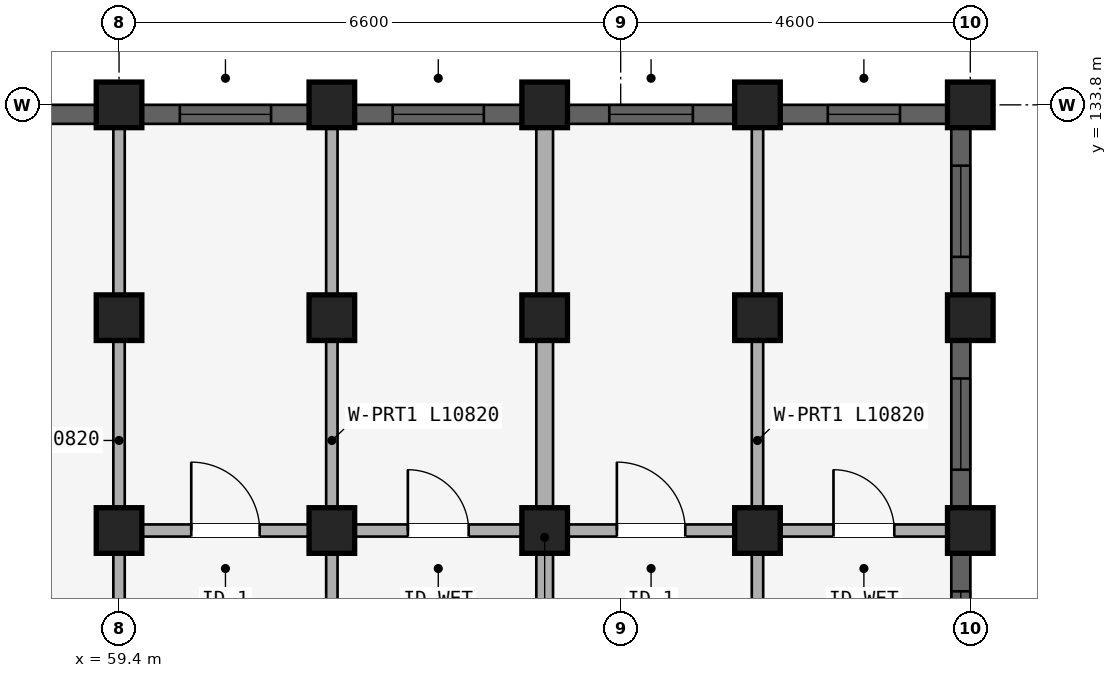
"""IFC4 building model, lengths in metres.
Left out: names, types, materials, properties, quantities, classifications, styles, units other than length and angle.
Written with IfcOpenShell. Run it as: python <this file> out.ifc"""

import sys

from ifc_helpers import new_model, si_unit, direction, frame, frame_2d, origin, origin_2d, place, context, subcontext, project, spatial, rectangle, extrude, element, fill, save


model = new_model("IFC4")
c1 = context("Model", 3, precision=1e-05, world=origin(), true_north=direction((0.0, 1.0)))
c2 = subcontext(c1, "Body", "Model", "MODEL_VIEW")
j1 = project(units=[si_unit("LENGTHUNIT", "METRE"), si_unit("PLANEANGLEUNIT", "RADIAN")], contexts=[c1])
p1 = place(None, origin())
s1 = spatial("IfcSite", under=j1, at=p1, CompositionType="ELEMENT")
p2 = place(p1, origin())
s2 = spatial("IfcBuilding", under=s1, at=p2, CompositionType="ELEMENT")
p3 = place(p2, frame((0.0, 0.0, 30.75)))
s3 = spatial("IfcBuildingStorey", under=s2, at=p3, CompositionType="ELEMENT", Elevation=30.75)
for number, where, z_axis, x_axis in (
    (1, (59.4, 128.2, 0.0), (0.0, 0.0, 1.0), (1.0, 0.0, 0.0)),
    (2, (59.4, 131.0, 0.0), (0.0, 0.0, 1.0), (1.0, 0.0, 0.0)),
    (3, (59.4, 133.8, 0.0), (0.0, 0.0, 1.0), (1.0, 0.0, 0.0)),
    (4, (62.2, 128.2, 0.0), (0.0, 0.0, 1.0), (1.0, 0.0, 0.0)),
    (5, (62.2, 131.0, 0.0), (0.0, 0.0, 1.0), (1.0, 0.0, 0.0)),
    (6, (62.2, 133.8, 0.0), (0.0, 0.0, 1.0), (1.0, 0.0, 0.0)),
    (7, (65.0, 128.2, 0.0), (0.0, 0.0, 1.0), (1.0, 0.0, 0.0)),
    (8, (65.0, 131.0, 0.0), (0.0, 0.0, 1.0), (1.0, 0.0, 0.0)),
    (9, (65.0, 133.8, 0.0), (0.0, 0.0, 1.0), (1.0, 0.0, 0.0)),
    (10, (67.8, 128.2, 0.0), (0.0, 0.0, 1.0), (1.0, 0.0, 0.0)),
    (11, (67.8, 131.0, 0.0), (0.0, 0.0, 1.0), (1.0, 0.0, 0.0)),
    (12, (67.8, 133.8, 0.0), (0.0, 0.0, 1.0), (1.0, 0.0, 0.0)),
    (13, (70.6, 128.2, 0.0), (0.0, 0.0, 1.0), (1.0, 0.0, 0.0)),
    (14, (70.6, 131.0, 0.0), (0.0, 0.0, 1.0), (1.0, 0.0, 0.0)),
    (15, (70.6, 133.8, 0.0), (0.0, 0.0, 1.0), (1.0, 0.0, 0.0)),
):
    element("IfcColumn", number, at=place(p3, frame(where, z_axis=z_axis, x_axis=x_axis)), inside=s3, PredefinedType="COLUMN", context=c2, shape_type="SweptSolid", body=[
        extrude(rectangle(XDim=0.6, YDim=0.6, at=origin_2d()), origin(), (0.0, 0.0, 1.0), 2.93),
    ])
p4 = place(p3, frame((59.48, 128.2, 0.0), z_axis=(0.0, 0.0, 1.0), x_axis=(1.0, 0.0, 0.0)))
e16 = element("IfcWall", 16, at=p4, inside=s3, PredefinedType="PLUMBINGWALL", context=c2, shape_type="SweptSolid", body=[
    extrude(rectangle(XDim=2.64, YDim=0.16, at=frame_2d((1.32, 0.0))), origin(), (0.0, 0.0, 1.0), 2.372),
])
p5 = place(p4, frame((0.87, 0.0, 0.0)))
e17 = element("IfcOpeningElement", 17, at=p5, cuts=e16, PredefinedType="OPENING", context=c2, shape_type="SweptSolid", body=[
    extrude(rectangle(XDim=0.9, YDim=2.1, at=frame_2d((0.45, 1.05))), frame((0.0, 0.09, 0.0), z_axis=(0.0, -1.0, 0.0), x_axis=(1.0, 0.0, 0.0)), (0.0, 0.0, 1.0), 0.18),
])
p6 = place(p3, frame((62.28, 128.2, 0.0), z_axis=(0.0, 0.0, 1.0), x_axis=(1.0, 0.0, 0.0)))
e18 = element("IfcWall", 18, at=p6, inside=s3, PredefinedType="PLUMBINGWALL", context=c2, shape_type="SweptSolid", body=[
    extrude(rectangle(XDim=2.64, YDim=0.16, at=frame_2d((1.32, 0.0))), origin(), (0.0, 0.0, 1.0), 2.372),
])
p7 = place(p6, frame((0.92, 0.0, 0.0)))
e19 = element("IfcOpeningElement", 19, at=p7, cuts=e18, PredefinedType="OPENING", context=c2, shape_type="SweptSolid", body=[
    extrude(rectangle(XDim=0.8, YDim=2.1, at=frame_2d((0.4, 1.05))), frame((0.0, 0.09, 0.0), z_axis=(0.0, -1.0, 0.0), x_axis=(1.0, 0.0, 0.0)), (0.0, 0.0, 1.0), 0.18),
])
p8 = place(p3, frame((65.08, 128.2, 0.0), z_axis=(0.0, 0.0, 1.0), x_axis=(1.0, 0.0, 0.0)))
e20 = element("IfcWall", 20, at=p8, inside=s3, PredefinedType="PLUMBINGWALL", context=c2, shape_type="SweptSolid", body=[
    extrude(rectangle(XDim=2.64, YDim=0.16, at=frame_2d((1.32, 0.0))), origin(), (0.0, 0.0, 1.0), 2.372),
])
p9 = place(p8, frame((0.87, 0.0, 0.0)))
e21 = element("IfcOpeningElement", 21, at=p9, cuts=e20, PredefinedType="OPENING", context=c2, shape_type="SweptSolid", body=[
    extrude(rectangle(XDim=0.9, YDim=2.1, at=frame_2d((0.45, 1.05))), frame((0.0, 0.09, 0.0), z_axis=(0.0, -1.0, 0.0), x_axis=(1.0, 0.0, 0.0)), (0.0, 0.0, 1.0), 0.18),
])
p10 = place(p3, frame((67.88, 128.2, 0.0), z_axis=(0.0, 0.0, 1.0), x_axis=(1.0, 0.0, 0.0)))
e22 = element("IfcWall", 22, at=p10, inside=s3, PredefinedType="PLUMBINGWALL", context=c2, shape_type="SweptSolid", body=[
    extrude(rectangle(XDim=2.64, YDim=0.16, at=frame_2d((1.32, 0.0))), origin(), (0.0, 0.0, 1.0), 2.372),
])
p11 = place(p10, frame((0.92, 0.0, 0.0)))
e23 = element("IfcOpeningElement", 23, at=p11, cuts=e22, PredefinedType="OPENING", context=c2, shape_type="SweptSolid", body=[
    extrude(rectangle(XDim=0.8, YDim=2.1, at=frame_2d((0.4, 1.05))), frame((0.0, 0.09, 0.0), z_axis=(0.0, -1.0, 0.0), x_axis=(1.0, 0.0, 0.0)), (0.0, 0.0, 1.0), 0.18),
])
p12 = place(p3, frame((59.4, 122.7, 0.0), z_axis=(0.0, 0.0, 1.0), x_axis=(0.0, 1.0, 0.0)))
e24 = element("IfcWall", 24, at=p12, inside=s3, PredefinedType="PARTITIONING", context=c2, shape_type="SweptSolid", body=[
    extrude(rectangle(XDim=10.82, YDim=0.15, at=frame_2d((5.41, 0.0))), origin(), (0.0, 0.0, 1.0), 2.372),
])
p13 = place(p12, frame((0.899, 0.0, 0.0)))
e25 = element("IfcOpeningElement", 25, at=p13, cuts=e24, PredefinedType="OPENING", context=c2, shape_type="SweptSolid", body=[
    extrude(rectangle(XDim=0.8, YDim=2.1, at=frame_2d((0.4, 1.05))), frame((0.0, 0.085, 0.0), z_axis=(0.0, -1.0, 0.0), x_axis=(1.0, 0.0, 0.0)), (0.0, 0.0, 1.0), 0.17),
])
p14 = place(p3, frame((62.2, 122.7, 0.0), z_axis=(0.0, 0.0, 1.0), x_axis=(0.0, 1.0, 0.0)))
e26 = element("IfcWall", 26, at=p14, inside=s3, PredefinedType="PARTITIONING", context=c2, shape_type="SweptSolid", body=[
    extrude(rectangle(XDim=10.82, YDim=0.15, at=frame_2d((5.41, 0.0))), origin(), (0.0, 0.0, 1.0), 2.372),
])
p15 = place(p14, frame((0.899, 0.0, 0.0)))
e27 = element("IfcOpeningElement", 27, at=p15, cuts=e26, PredefinedType="OPENING", context=c2, shape_type="SweptSolid", body=[
    extrude(rectangle(XDim=0.8, YDim=2.1, at=frame_2d((0.4, 1.05))), frame((0.0, 0.085, 0.0), z_axis=(0.0, -1.0, 0.0), x_axis=(1.0, 0.0, 0.0)), (0.0, 0.0, 1.0), 0.17),
])
p16 = place(p3, frame((65.0, 122.7, 0.0), z_axis=(0.0, 0.0, 1.0), x_axis=(0.0, 1.0, 0.0)))
e28 = element("IfcWall", 28, at=p16, inside=s3, PredefinedType="STANDARD", context=c2, shape_type="SweptSolid", body=[
    extrude(rectangle(XDim=10.82, YDim=0.22, at=frame_2d((5.41, 0.0))), origin(), (0.0, 0.0, 1.0), 2.372),
])
p17 = place(p3, frame((67.8, 122.7, 0.0), z_axis=(0.0, 0.0, 1.0), x_axis=(0.0, 1.0, 0.0)))
e29 = element("IfcWall", 29, at=p17, inside=s3, PredefinedType="PARTITIONING", context=c2, shape_type="SweptSolid", body=[
    extrude(rectangle(XDim=10.82, YDim=0.15, at=frame_2d((5.41, 0.0))), origin(), (0.0, 0.0, 1.0), 2.372),
])
p18 = place(p17, frame((0.899, 0.0, 0.0)))
e30 = element("IfcOpeningElement", 30, at=p18, cuts=e29, PredefinedType="OPENING", context=c2, shape_type="SweptSolid", body=[
    extrude(rectangle(XDim=0.8, YDim=2.1, at=frame_2d((0.4, 1.05))), frame((0.0, 0.085, 0.0), z_axis=(0.0, -1.0, 0.0), x_axis=(1.0, 0.0, 0.0)), (0.0, 0.0, 1.0), 0.17),
])
p19 = place(p3, frame((54.104, 133.675, 0.0), z_axis=(0.0, 0.0, 1.0), x_axis=(1.0, 0.0, 0.0)))
e31 = element("IfcWall", 31, at=p19, inside=s3, PredefinedType="STANDARD", context=c2, shape_type="SweptSolid", body=[
    extrude(rectangle(XDim=4.993, YDim=0.25, at=frame_2d((2.497, 0.0))), origin(), (0.0, 0.0, 1.0), 2.472),
])
p20 = place(p19, frame((2.021, 0.0, 0.88)))
e32 = element("IfcOpeningElement", 32, at=p20, cuts=e31, PredefinedType="OPENING", context=c2, shape_type="SweptSolid", body=[
    extrude(rectangle(XDim=0.95, YDim=1.35, at=frame_2d((0.475, 0.675))), frame((0.0, 0.135, 0.0), z_axis=(0.0, -1.0, 0.0), x_axis=(1.0, 0.0, 0.0)), (0.0, 0.0, 1.0), 0.27),
])
p21 = place(p3, frame((59.704, 133.675, 0.0), z_axis=(0.0, 0.0, 1.0), x_axis=(1.0, 0.0, 0.0)))
e33 = element("IfcWall", 33, at=p21, inside=s3, PredefinedType="STANDARD", context=c2, shape_type="SweptSolid", body=[
    extrude(rectangle(XDim=2.193, YDim=0.25, at=frame_2d((1.096, 0.0))), origin(), (0.0, 0.0, 1.0), 2.472),
])
p22 = place(p21, frame((0.497, 0.0, 0.772)))
e34 = element("IfcOpeningElement", 34, at=p22, cuts=e33, PredefinedType="OPENING", context=c2, shape_type="SweptSolid", body=[
    extrude(rectangle(XDim=1.2, YDim=1.5, at=frame_2d((0.6, 0.75))), frame((0.0, 0.135, 0.0), z_axis=(0.0, -1.0, 0.0), x_axis=(1.0, 0.0, 0.0)), (0.0, 0.0, 1.0), 0.27),
])
p23 = place(p3, frame((62.503, 133.675, 0.0), z_axis=(0.0, 0.0, 1.0), x_axis=(1.0, 0.0, 0.0)))
e35 = element("IfcWall", 35, at=p23, inside=s3, PredefinedType="STANDARD", context=c2, shape_type="SweptSolid", body=[
    extrude(rectangle(XDim=2.193, YDim=0.25, at=frame_2d((1.097, 0.0))), origin(), (0.0, 0.0, 1.0), 2.472),
])
p24 = place(p23, frame((0.497, 0.0, 0.772)))
e36 = element("IfcOpeningElement", 36, at=p24, cuts=e35, PredefinedType="OPENING", context=c2, shape_type="SweptSolid", body=[
    extrude(rectangle(XDim=1.2, YDim=1.5, at=frame_2d((0.6, 0.75))), frame((0.0, 0.135, 0.0), z_axis=(0.0, -1.0, 0.0), x_axis=(1.0, 0.0, 0.0)), (0.0, 0.0, 1.0), 0.27),
])
p25 = place(p3, frame((65.303, 133.675, 0.0), z_axis=(0.0, 0.0, 1.0), x_axis=(1.0, 0.0, 0.0)))
e37 = element("IfcWall", 37, at=p25, inside=s3, PredefinedType="STANDARD", context=c2, shape_type="SweptSolid", body=[
    extrude(rectangle(XDim=2.193, YDim=0.25, at=frame_2d((1.097, 0.0))), origin(), (0.0, 0.0, 1.0), 2.472),
])
p26 = place(p25, frame((0.546, 0.0, 0.822)))
e38 = element("IfcOpeningElement", 38, at=p26, cuts=e37, PredefinedType="OPENING", context=c2, shape_type="SweptSolid", body=[
    extrude(rectangle(XDim=1.1, YDim=1.45, at=frame_2d((0.55, 0.725))), frame((0.0, 0.135, 0.0), z_axis=(0.0, -1.0, 0.0), x_axis=(1.0, 0.0, 0.0)), (0.0, 0.0, 1.0), 0.27),
])
p27 = place(p3, frame((68.104, 133.675, 0.0), z_axis=(0.0, 0.0, 1.0), x_axis=(1.0, 0.0, 0.0)))
e39 = element("IfcWall", 39, at=p27, inside=s3, PredefinedType="STANDARD", context=c2, shape_type="SweptSolid", body=[
    extrude(rectangle(XDim=2.193, YDim=0.25, at=frame_2d((1.096, 0.0))), origin(), (0.0, 0.0, 1.0), 2.472),
])
p28 = place(p27, frame((0.622, 0.0, 0.88)))
e40 = element("IfcOpeningElement", 40, at=p28, cuts=e39, PredefinedType="OPENING", context=c2, shape_type="SweptSolid", body=[
    extrude(rectangle(XDim=0.95, YDim=1.35, at=frame_2d((0.475, 0.675))), frame((0.0, 0.135, 0.0), z_axis=(0.0, -1.0, 0.0), x_axis=(1.0, 0.0, 0.0)), (0.0, 0.0, 1.0), 0.27),
])
p29 = place(p3, frame((70.475, 125.704, 0.0), z_axis=(0.0, 0.0, 1.0), x_axis=(0.0, 1.0, 0.0)))
e41 = element("IfcWall", 41, at=p29, inside=s3, PredefinedType="STANDARD", context=c2, shape_type="SweptSolid", body=[
    extrude(rectangle(XDim=2.193, YDim=0.25, at=frame_2d((1.096, 0.0))), origin(), (0.0, 0.0, 1.0), 2.372),
])
p30 = place(p29, frame((0.497, 0.0, 0.672)))
e42 = element("IfcOpeningElement", 42, at=p30, cuts=e41, PredefinedType="OPENING", context=c2, shape_type="SweptSolid", body=[
    extrude(rectangle(XDim=1.2, YDim=1.5, at=frame_2d((0.6, 0.75))), frame((0.0, 0.135, 0.0), z_axis=(0.0, -1.0, 0.0), x_axis=(1.0, 0.0, 0.0)), (0.0, 0.0, 1.0), 0.27),
])
p31 = place(p3, frame((70.475, 128.503, 0.0), z_axis=(0.0, 0.0, 1.0), x_axis=(0.0, 1.0, 0.0)))
e43 = element("IfcWall", 43, at=p31, inside=s3, PredefinedType="STANDARD", context=c2, shape_type="SweptSolid", body=[
    extrude(rectangle(XDim=2.193, YDim=0.25, at=frame_2d((1.097, 0.0))), origin(), (0.0, 0.0, 1.0), 2.372),
])
p32 = place(p31, frame((0.497, 0.0, 0.672)))
e44 = element("IfcOpeningElement", 44, at=p32, cuts=e43, PredefinedType="OPENING", context=c2, shape_type="SweptSolid", body=[
    extrude(rectangle(XDim=1.2, YDim=1.5, at=frame_2d((0.6, 0.75))), frame((0.0, 0.135, 0.0), z_axis=(0.0, -1.0, 0.0), x_axis=(1.0, 0.0, 0.0)), (0.0, 0.0, 1.0), 0.27),
])
p33 = place(p3, frame((70.475, 131.303, 0.0), z_axis=(0.0, 0.0, 1.0), x_axis=(0.0, 1.0, 0.0)))
e45 = element("IfcWall", 45, at=p33, inside=s3, PredefinedType="STANDARD", context=c2, shape_type="SweptSolid", body=[
    extrude(rectangle(XDim=2.193, YDim=0.25, at=frame_2d((1.097, 0.0))), origin(), (0.0, 0.0, 1.0), 2.372),
])
p34 = place(p33, frame((0.497, 0.0, 0.672)))
e46 = element("IfcOpeningElement", 46, at=p34, cuts=e45, PredefinedType="OPENING", context=c2, shape_type="SweptSolid", body=[
    extrude(rectangle(XDim=1.2, YDim=1.5, at=frame_2d((0.6, 0.75))), frame((0.0, 0.135, 0.0), z_axis=(0.0, -1.0, 0.0), x_axis=(1.0, 0.0, 0.0)), (0.0, 0.0, 1.0), 0.27),
])
p35 = place(p22, origin())
e47 = element("IfcWindow", 47, at=p35, inside=s3, PartitioningType="SINGLE_PANEL", PredefinedType="WINDOW", context=c2, shape_type="SweptSolid", body=[
    extrude(rectangle(XDim=1.2, YDim=1.5, at=frame_2d((0.6, 0.75))), frame((0.0, 0.03, 0.0), z_axis=(0.0, -1.0, 0.0), x_axis=(1.0, 0.0, 0.0)), (0.0, 0.0, 1.0), 0.06),
])
fill(e34, e47)
p36 = place(p24, origin())
e48 = element("IfcWindow", 48, at=p36, inside=s3, PartitioningType="SINGLE_PANEL", PredefinedType="WINDOW", context=c2, shape_type="SweptSolid", body=[
    extrude(rectangle(XDim=1.2, YDim=1.5, at=frame_2d((0.6, 0.75))), frame((0.0, 0.03, 0.0), z_axis=(0.0, -1.0, 0.0), x_axis=(1.0, 0.0, 0.0)), (0.0, 0.0, 1.0), 0.06),
])
fill(e36, e48)
p37 = place(p26, origin())
e49 = element("IfcWindow", 49, at=p37, inside=s3, PartitioningType="SINGLE_PANEL", PredefinedType="WINDOW", context=c2, shape_type="SweptSolid", body=[
    extrude(rectangle(XDim=1.1, YDim=1.45, at=frame_2d((0.55, 0.725))), frame((0.0, 0.03, 0.0), z_axis=(0.0, -1.0, 0.0), x_axis=(1.0, 0.0, 0.0)), (0.0, 0.0, 1.0), 0.06),
])
fill(e38, e49)
p38 = place(p28, origin())
e50 = element("IfcWindow", 50, at=p38, inside=s3, PartitioningType="SINGLE_PANEL", PredefinedType="WINDOW", context=c2, shape_type="SweptSolid", body=[
    extrude(rectangle(XDim=0.95, YDim=1.35, at=frame_2d((0.475, 0.675))), frame((0.0, 0.03, 0.0), z_axis=(0.0, -1.0, 0.0), x_axis=(1.0, 0.0, 0.0)), (0.0, 0.0, 1.0), 0.06),
])
fill(e40, e50)
p39 = place(p30, origin())
e51 = element("IfcWindow", 51, at=p39, inside=s3, PartitioningType="SINGLE_PANEL", PredefinedType="WINDOW", context=c2, shape_type="SweptSolid", body=[
    extrude(rectangle(XDim=1.2, YDim=1.5, at=frame_2d((0.6, 0.75))), frame((0.0, 0.03, 0.0), z_axis=(0.0, -1.0, 0.0), x_axis=(1.0, 0.0, 0.0)), (0.0, 0.0, 1.0), 0.06),
])
fill(e42, e51)
p40 = place(p32, origin())
e52 = element("IfcWindow", 52, at=p40, inside=s3, PartitioningType="SINGLE_PANEL", PredefinedType="WINDOW", context=c2, shape_type="SweptSolid", body=[
    extrude(rectangle(XDim=1.2, YDim=1.5, at=frame_2d((0.6, 0.75))), frame((0.0, 0.03, 0.0), z_axis=(0.0, -1.0, 0.0), x_axis=(1.0, 0.0, 0.0)), (0.0, 0.0, 1.0), 0.06),
])
fill(e44, e52)
p41 = place(p34, origin())
e53 = element("IfcWindow", 53, at=p41, inside=s3, PartitioningType="SINGLE_PANEL", PredefinedType="WINDOW", context=c2, shape_type="SweptSolid", body=[
    extrude(rectangle(XDim=1.2, YDim=1.5, at=frame_2d((0.6, 0.75))), frame((0.0, 0.03, 0.0), z_axis=(0.0, -1.0, 0.0), x_axis=(1.0, 0.0, 0.0)), (0.0, 0.0, 1.0), 0.06),
])
fill(e46, e53)
p42 = place(p5, origin())
e54 = element("IfcDoor", 54, at=p42, inside=s3, OperationType="SINGLE_SWING_LEFT", PredefinedType="DOOR", context=c2, shape_type="SweptSolid", body=[
    extrude(rectangle(XDim=0.9, YDim=2.1, at=frame_2d((0.45, 1.05))), frame((0.0, 0.025, 0.0), z_axis=(0.0, -1.0, 0.0), x_axis=(1.0, 0.0, 0.0)), (0.0, 0.0, 1.0), 0.05),
])
fill(e17, e54)
p43 = place(p7, origin())
e55 = element("IfcDoor", 55, at=p43, inside=s3, OperationType="SINGLE_SWING_LEFT", PredefinedType="DOOR", context=c2, shape_type="SweptSolid", body=[
    extrude(rectangle(XDim=0.8, YDim=2.1, at=frame_2d((0.4, 1.05))), frame((0.0, 0.025, 0.0), z_axis=(0.0, -1.0, 0.0), x_axis=(1.0, 0.0, 0.0)), (0.0, 0.0, 1.0), 0.05),
])
fill(e19, e55)
p44 = place(p9, origin())
e56 = element("IfcDoor", 56, at=p44, inside=s3, OperationType="SINGLE_SWING_LEFT", PredefinedType="DOOR", context=c2, shape_type="SweptSolid", body=[
    extrude(rectangle(XDim=0.9, YDim=2.1, at=frame_2d((0.45, 1.05))), frame((0.0, 0.025, 0.0), z_axis=(0.0, -1.0, 0.0), x_axis=(1.0, 0.0, 0.0)), (0.0, 0.0, 1.0), 0.05),
])
fill(e21, e56)
p45 = place(p11, origin())
e57 = element("IfcDoor", 57, at=p45, inside=s3, OperationType="SINGLE_SWING_LEFT", PredefinedType="DOOR", context=c2, shape_type="SweptSolid", body=[
    extrude(rectangle(XDim=0.8, YDim=2.1, at=frame_2d((0.4, 1.05))), frame((0.0, 0.025, 0.0), z_axis=(0.0, -1.0, 0.0), x_axis=(1.0, 0.0, 0.0)), (0.0, 0.0, 1.0), 0.05),
])
fill(e23, e57)
save(model, sys.argv[1])
